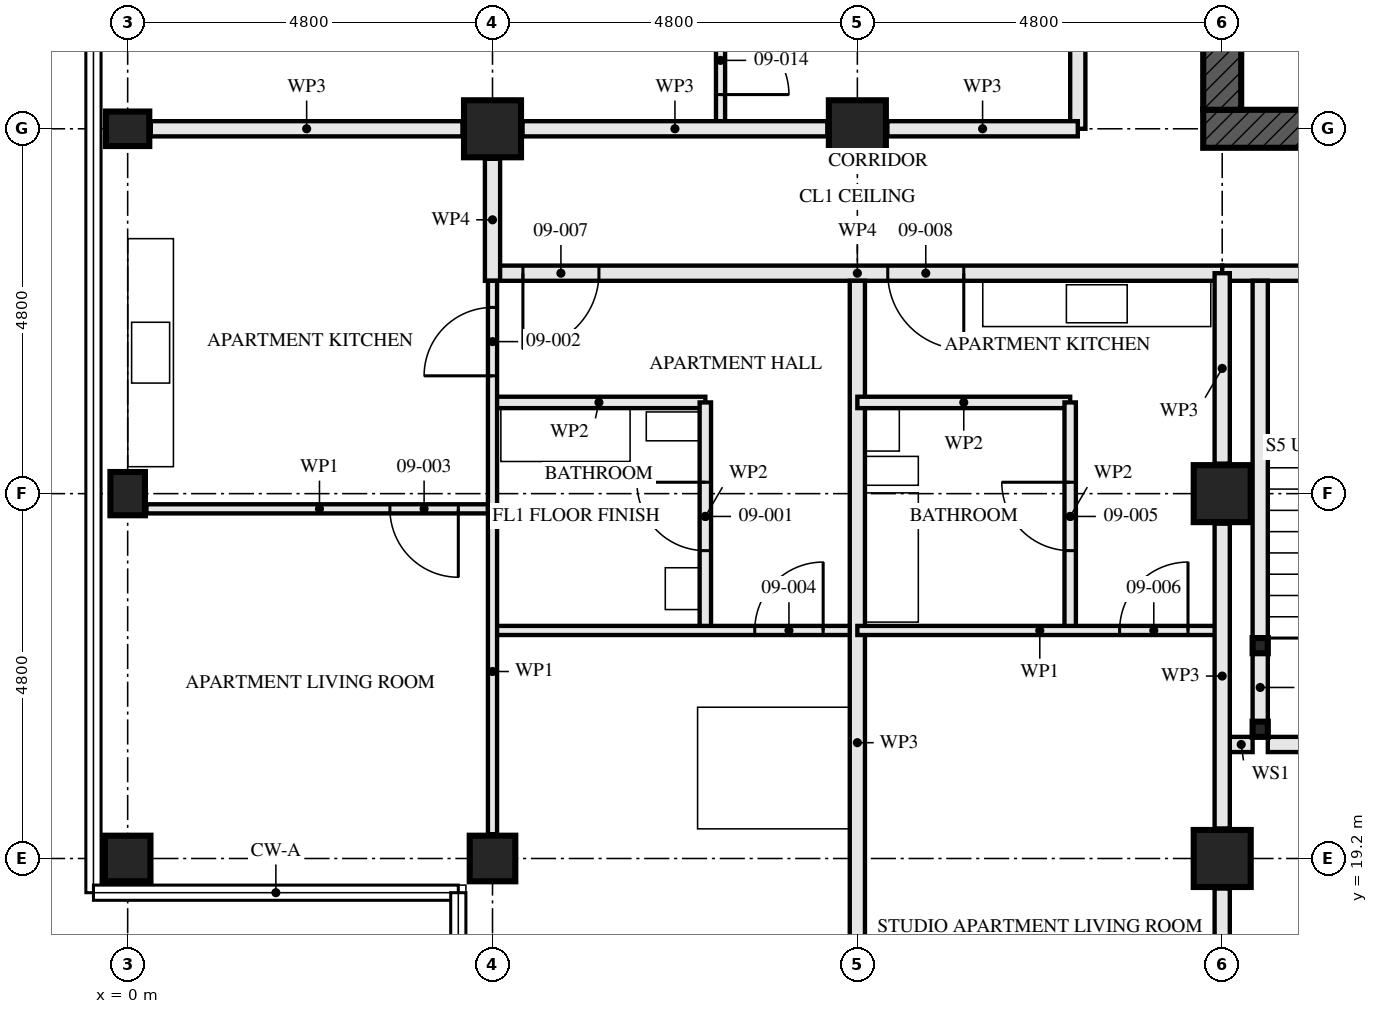
"""IFC4 building model, lengths in metres.
Left out: names, types, materials, properties, quantities, classifications, styles, units other than length and angle.
Written with IfcOpenShell. Run it as: python <this file> out.ifc"""

import sys

from ifc_helpers import new_model, si_unit, direction, frame, frame_2d, origin, origin_2d, place, context, subcontext, project, spatial, rectangle, hollow_rectangle, i_section, extrude, element, fill, save


model = new_model("IFC4")
c1 = context("Model", 3, precision=1e-05, world=origin(), true_north=direction((0.0, 1.0)))
c2 = subcontext(c1, "Body", "Model", "MODEL_VIEW")
j1 = project(units=[si_unit("LENGTHUNIT", "METRE"), si_unit("PLANEANGLEUNIT", "RADIAN")], contexts=[c1])
p1 = place(None, origin())
s1 = spatial("IfcSite", under=j1, at=p1, CompositionType="ELEMENT")
p2 = place(p1, origin())
s2 = spatial("IfcBuilding", under=s1, at=p2, CompositionType="ELEMENT")
p3 = place(p2, frame((0.0, 0.0, 37.5)))
s3 = spatial("IfcBuildingStorey", under=s2, at=p3, CompositionType="ELEMENT", Elevation=37.5)
p4 = place(p3, frame((0.0, 19.2, 0.0), z_axis=(0.0, 0.0, 1.0), x_axis=(0.0, 1.0, 0.0)))
e1 = element("IfcColumn", 1, at=p4, inside=s3, PredefinedType="COLUMN", context=c2, shape_type="SweptSolid", body=[
    extrude(hollow_rectangle(XDim=0.6, YDim=0.6, WallThickness=0.05, at=origin_2d()), origin(), (0.0, 0.0, 1.0), 3.5),
])
for number, where, z_axis, x_axis in (
    (2, (0.0, 24.0, 0.0), (0.0, 0.0, 1.0), (1.0, 0.0, 0.0)),
    (3, (0.0, 28.8, 0.0), (0.0, 0.0, 1.0), (0.0, 1.0, 0.0)),
):
    element("IfcColumn", number, at=place(p3, frame(where, z_axis=z_axis, x_axis=x_axis)), inside=s3, PredefinedType="COLUMN", context=c2, shape_type="SweptSolid", body=[
        extrude(i_section(OverallWidth=0.454, OverallDepth=0.569, WebThickness=0.078, FlangeThickness=0.125, FilletRadius=0.015, at=origin_2d()), origin(), (0.0, 0.0, 1.0), 3.5),
    ])
p5 = place(p3, frame((4.8, 19.2, 0.0), z_axis=(0.0, 0.0, 1.0), x_axis=(0.0, 1.0, 0.0)))
e4 = element("IfcColumn", 4, at=p5, inside=s3, PredefinedType="COLUMN", context=c2, shape_type="SweptSolid", body=[
    extrude(hollow_rectangle(XDim=0.6, YDim=0.6, WallThickness=0.05, at=origin_2d()), origin(), (0.0, 0.0, 1.0), 3.5),
])
for number, where, z_axis, x_axis in (
    (5, (4.8, 28.8, 0.0), (0.0, 0.0, 1.0), (0.0, 1.0, 0.0)),
    (6, (9.6, 28.8, 0.0), (0.0, 0.0, 1.0), (0.0, 1.0, 0.0)),
    (7, (14.4, 19.2, 0.0), (0.0, 0.0, 1.0), (1.0, 0.0, 0.0)),
    (8, (14.4, 24.0, 0.0), (0.0, 0.0, 1.0), (1.0, 0.0, 0.0)),
):
    element("IfcColumn", number, at=place(p3, frame(where, z_axis=z_axis, x_axis=x_axis)), inside=s3, PredefinedType="COLUMN", context=c2, shape_type="SweptSolid", body=[
        extrude(hollow_rectangle(XDim=0.75, YDim=0.75, WallThickness=0.08, at=origin_2d()), origin(), (0.0, 0.0, 1.0), 3.5),
    ])
p6 = place(p3, frame((14.15, 28.8, -0.17), z_axis=(0.0, 0.0, 1.0), x_axis=(1.0, 0.0, 0.0)))
e9 = element("IfcWall", 9, at=p6, inside=s3, PredefinedType="SHEAR", context=c2, shape_type="SweptSolid", body=[
    extrude(rectangle(XDim=14.9, YDim=0.5, at=frame_2d((7.45, 0.0))), origin(), (0.0, 0.0, 1.0), 3.5),
])
p7 = place(p6, frame((6.85, 0.0, 0.17)))
e10 = element("IfcOpeningElement", 10, at=p7, cuts=e9, PredefinedType="OPENING", context=c2, shape_type="SweptSolid", body=[
    extrude(rectangle(XDim=1.2, YDim=2.1, at=frame_2d((0.6, 1.05))), frame((0.0, 0.26, 0.0), z_axis=(0.0, -1.0, 0.0), x_axis=(1.0, 0.0, 0.0)), (0.0, 0.0, 1.0), 0.521),
])
p8 = place(p3, frame((14.4, 42.95, -0.17), z_axis=(0.0, 0.0, 1.0), x_axis=(0.0, -1.0, 0.0)))
e11 = element("IfcWall", 11, at=p8, inside=s3, PredefinedType="SHEAR", context=c2, shape_type="SweptSolid", body=[
    extrude(rectangle(XDim=13.9, YDim=0.5, at=frame_2d((6.95, 0.0))), origin(), (0.0, 0.0, 1.0), 3.5),
])
p9 = place(p8, frame((6.35, 0.0, 0.17)))
e12 = element("IfcOpeningElement", 12, at=p9, cuts=e11, PredefinedType="OPENING", context=c2, shape_type="SweptSolid", body=[
    extrude(rectangle(XDim=1.2, YDim=2.1, at=frame_2d((0.6, 1.05))), frame((0.0, 0.26, 0.0), z_axis=(0.0, -1.0, 0.0), x_axis=(1.0, 0.0, 0.0)), (0.0, 0.0, 1.0), 0.521),
])
for number, where, z_axis, x_axis in (
    (13, (14.9, 20.9, 0.0), (0.0, 0.0, 1.0), (1.0, 0.0, 0.0)),
    (14, (14.9, 22.0, 0.0), (0.0, 0.0, 1.0), (1.0, 0.0, 0.0)),
):
    element("IfcColumn", number, at=place(p3, frame(where, z_axis=z_axis, x_axis=x_axis)), inside=s3, PredefinedType="COLUMN", context=c2, shape_type="SweptSolid", body=[
        extrude(hollow_rectangle(XDim=0.2, YDim=0.2, WallThickness=0.008, at=origin_2d()), origin(), (0.0, 0.0, 1.0), 3.33),
    ])
p10 = place(p3, frame((7.6, 22.2, 0.0), z_axis=(0.0, 0.0, 1.0), x_axis=(0.0, 1.0, 0.0)))
e15 = element("IfcWall", 15, at=p10, inside=s3, PredefinedType="PARTITIONING", context=c2, shape_type="SweptSolid", body=[
    extrude(rectangle(XDim=3.0, YDim=0.15, at=frame_2d((1.5, 0.0))), origin(), (0.0, 0.0, 1.0), 2.55),
])
p11 = place(p10, frame((1.05, 0.0, 0.0)))
e16 = element("IfcOpeningElement", 16, at=p11, cuts=e15, PredefinedType="OPENING", context=c2, shape_type="SweptSolid", body=[
    extrude(rectangle(XDim=0.9, YDim=2.1, at=frame_2d((0.45, 1.05))), frame((0.0, 0.085, 0.0), z_axis=(0.0, -1.0, 0.0), x_axis=(1.0, 0.0, 0.0)), (0.0, 0.0, 1.0), 0.171),
])
p12 = place(p3, frame((4.8, 25.2, 0.0), z_axis=(0.0, 0.0, 1.0), x_axis=(1.0, 0.0, 0.0)))
e17 = element("IfcWall", 17, at=p12, inside=s3, PredefinedType="PARTITIONING", context=c2, shape_type="SweptSolid", body=[
    extrude(rectangle(XDim=2.8, YDim=0.15, at=frame_2d((1.4, 0.0))), origin(), (0.0, 0.0, 1.0), 3.33),
])
p13 = place(p3, frame((4.8, 23.8, 0.0), z_axis=(0.0, 0.0, 1.0), x_axis=(0.0, 1.0, 0.0)))
e18 = element("IfcWall", 18, at=p13, inside=s3, PredefinedType="PARTITIONING", context=c2, shape_type="SweptSolid", body=[
    extrude(rectangle(XDim=3.0, YDim=0.12, at=frame_2d((1.5, 0.0))), origin(), (0.0, 0.0, 1.0), 2.55),
])
p14 = place(p13, frame((1.75, 0.0, 0.0)))
e19 = element("IfcOpeningElement", 19, at=p14, cuts=e18, PredefinedType="OPENING", context=c2, shape_type="SweptSolid", body=[
    extrude(rectangle(XDim=0.9, YDim=2.1, at=frame_2d((0.45, 1.05))), frame((0.0, 0.071, 0.0), z_axis=(0.0, -1.0, 0.0), x_axis=(1.0, 0.0, 0.0)), (0.0, 0.0, 1.0), 0.141),
])
p15 = place(p3, frame((0.247, 23.8, 0.0), z_axis=(0.0, 0.0, 1.0), x_axis=(1.0, 0.0, 0.0)))
e20 = element("IfcWall", 20, at=p15, inside=s3, PredefinedType="PARTITIONING", context=c2, shape_type="SweptSolid", body=[
    extrude(rectangle(XDim=4.553, YDim=0.12, at=frame_2d((2.276, 0.0))), origin(), (0.0, 0.0, 1.0), 3.33),
])
p16 = place(p15, frame((3.203, 0.0, 0.0)))
e21 = element("IfcOpeningElement", 21, at=p16, cuts=e20, PredefinedType="OPENING", context=c2, shape_type="SweptSolid", body=[
    extrude(rectangle(XDim=0.9, YDim=2.1, at=frame_2d((0.45, 1.05))), frame((0.0, 0.071, 0.0), z_axis=(0.0, -1.0, 0.0), x_axis=(1.0, 0.0, 0.0)), (0.0, 0.0, 1.0), 0.141),
])
p17 = place(p3, frame((4.8, 22.2, 0.0), z_axis=(0.0, 0.0, 1.0), x_axis=(1.0, 0.0, 0.0)))
e22 = element("IfcWall", 22, at=p17, inside=s3, PredefinedType="PARTITIONING", context=c2, shape_type="SweptSolid", body=[
    extrude(rectangle(XDim=4.8, YDim=0.12, at=frame_2d((2.4, 0.0))), origin(), (0.0, 0.0, 1.0), 3.33),
])
p18 = place(p17, frame((3.45, 0.0, 0.0)))
e23 = element("IfcOpeningElement", 23, at=p18, cuts=e22, PredefinedType="OPENING", context=c2, shape_type="SweptSolid", body=[
    extrude(rectangle(XDim=0.9, YDim=2.1, at=frame_2d((0.45, 1.05))), frame((0.0, 0.071, 0.0), z_axis=(0.0, -1.0, 0.0), x_axis=(1.0, 0.0, 0.0)), (0.0, 0.0, 1.0), 0.141),
])
p19 = place(p3, frame((4.8, 19.52, 0.0), z_axis=(0.0, 0.0, 1.0), x_axis=(0.0, 1.0, 0.0)))
e24 = element("IfcWall", 24, at=p19, inside=s3, PredefinedType="PARTITIONING", context=c2, shape_type="SweptSolid", body=[
    extrude(rectangle(XDim=4.28, YDim=0.12, at=frame_2d((2.14, 0.0))), origin(), (0.0, 0.0, 1.0), 3.33),
])
p20 = place(p3, frame((9.6, 14.647, 0.0), z_axis=(0.0, 0.0, 1.0), x_axis=(0.0, 1.0, 0.0)))
e25 = element("IfcWall", 25, at=p20, inside=s3, PredefinedType="PARTITIONING", context=c2, shape_type="SweptSolid", body=[
    extrude(rectangle(XDim=12.153, YDim=0.2, at=frame_2d((6.077, 0.0))), origin(), (0.0, 0.0, 1.0), 2.55),
])
p21 = place(p3, frame((12.4, 22.2, 0.0), z_axis=(0.0, 0.0, 1.0), x_axis=(0.0, 1.0, 0.0)))
e26 = element("IfcWall", 26, at=p21, inside=s3, PredefinedType="PARTITIONING", context=c2, shape_type="SweptSolid", body=[
    extrude(rectangle(XDim=3.0, YDim=0.15, at=frame_2d((1.5, 0.0))), origin(), (0.0, 0.0, 1.0), 2.55),
])
p22 = place(p21, frame((1.05, 0.0, 0.0)))
e27 = element("IfcOpeningElement", 27, at=p22, cuts=e26, PredefinedType="OPENING", context=c2, shape_type="SweptSolid", body=[
    extrude(rectangle(XDim=0.9, YDim=2.1, at=frame_2d((0.45, 1.05))), frame((0.0, 0.085, 0.0), z_axis=(0.0, -1.0, 0.0), x_axis=(1.0, 0.0, 0.0)), (0.0, 0.0, 1.0), 0.171),
])
p23 = place(p3, frame((9.6, 25.2, 0.0), z_axis=(0.0, 0.0, 1.0), x_axis=(1.0, 0.0, 0.0)))
e28 = element("IfcWall", 28, at=p23, inside=s3, PredefinedType="PARTITIONING", context=c2, shape_type="SweptSolid", body=[
    extrude(rectangle(XDim=2.8, YDim=0.15, at=frame_2d((1.4, 0.0))), origin(), (0.0, 0.0, 1.0), 3.33),
])
p24 = place(p3, frame((9.6, 22.2, 0.0), z_axis=(0.0, 0.0, 1.0), x_axis=(1.0, 0.0, 0.0)))
e29 = element("IfcWall", 29, at=p24, inside=s3, PredefinedType="PARTITIONING", context=c2, shape_type="SweptSolid", body=[
    extrude(rectangle(XDim=4.8, YDim=0.12, at=frame_2d((2.4, 0.0))), origin(), (0.0, 0.0, 1.0), 3.33),
])
p25 = place(p24, frame((3.45, 0.0, 0.0)))
e30 = element("IfcOpeningElement", 30, at=p25, cuts=e29, PredefinedType="OPENING", context=c2, shape_type="SweptSolid", body=[
    extrude(rectangle(XDim=0.9, YDim=2.1, at=frame_2d((0.45, 1.05))), frame((0.0, 0.071, 0.0), z_axis=(0.0, -1.0, 0.0), x_axis=(1.0, 0.0, 0.0)), (0.0, 0.0, 1.0), 0.141),
])
p26 = place(p3, frame((4.8, 26.9, 0.0), z_axis=(0.0, 0.0, 1.0), x_axis=(1.0, 0.0, 0.0)))
e31 = element("IfcWall", 31, at=p26, inside=s3, PredefinedType="PARTITIONING", context=c2, shape_type="SweptSolid", body=[
    extrude(rectangle(XDim=9.6, YDim=0.2, at=frame_2d((4.8, 0.0))), origin(), (0.0, 0.0, 1.0), 3.33),
])
p27 = place(p26, frame((0.4, 0.0, 0.0)))
e32 = element("IfcOpeningElement", 32, at=p27, cuts=e31, PredefinedType="OPENING", context=c2, shape_type="SweptSolid", body=[
    extrude(rectangle(XDim=1.0, YDim=2.1, at=frame_2d((0.5, 1.05))), frame((0.0, 0.111, 0.0), z_axis=(0.0, -1.0, 0.0), x_axis=(1.0, 0.0, 0.0)), (0.0, 0.0, 1.0), 0.221),
])
p28 = place(p26, frame((5.2, 0.0, 0.0)))
e33 = element("IfcOpeningElement", 33, at=p28, cuts=e31, PredefinedType="OPENING", context=c2, shape_type="SweptSolid", body=[
    extrude(rectangle(XDim=1.0, YDim=2.1, at=frame_2d((0.5, 1.05))), frame((0.0, 0.111, 0.0), z_axis=(0.0, -1.0, 0.0), x_axis=(1.0, 0.0, 0.0)), (0.0, 0.0, 1.0), 0.221),
])
p29 = place(p3, frame((4.8, 26.8, 0.0), z_axis=(0.0, 0.0, 1.0), x_axis=(0.0, 1.0, 0.0)))
e34 = element("IfcWall", 34, at=p29, inside=s3, PredefinedType="PARTITIONING", context=c2, shape_type="SweptSolid", body=[
    extrude(rectangle(XDim=1.605, YDim=0.2, at=frame_2d((0.802, 0.0))), origin(), (0.0, 0.0, 1.0), 3.33),
])
p30 = place(p3, frame((7.8, 33.6, 0.0), z_axis=(0.0, 0.0, 1.0), x_axis=(0.0, -1.0, 0.0)))
e35 = element("IfcWall", 35, at=p30, inside=s3, PredefinedType="PARTITIONING", context=c2, shape_type="SweptSolid", body=[
    extrude(rectangle(XDim=4.8, YDim=0.12, at=frame_2d((2.4, 0.0))), origin(), (0.0, 0.0, 1.0), 3.33),
])
p31 = place(p30, frame((3.45, 0.0, 0.0)))
e36 = element("IfcOpeningElement", 36, at=p31, cuts=e35, PredefinedType="OPENING", context=c2, shape_type="SweptSolid", body=[
    extrude(rectangle(XDim=0.9, YDim=2.1, at=frame_2d((0.45, 1.05))), frame((0.0, 0.071, 0.0), z_axis=(0.0, -1.0, 0.0), x_axis=(1.0, 0.0, 0.0)), (0.0, 0.0, 1.0), 0.141),
])
p32 = place(p3, frame((12.5, 43.2, 0.0), z_axis=(0.0, 0.0, 1.0), x_axis=(0.0, -1.0, 0.0)))
e37 = element("IfcWall", 37, at=p32, inside=s3, PredefinedType="PARTITIONING", context=c2, shape_type="SweptSolid", body=[
    extrude(rectangle(XDim=14.4, YDim=0.2, at=frame_2d((7.2, 0.0))), origin(), (0.0, 0.0, 1.0), 2.55),
])
p33 = place(p32, frame((1.4, 0.0, 0.0)))
e38 = element("IfcOpeningElement", 38, at=p33, cuts=e37, PredefinedType="OPENING", context=c2, shape_type="SweptSolid", body=[
    extrude(rectangle(XDim=1.0, YDim=2.1, at=frame_2d((0.5, 1.05))), frame((0.0, 0.111, 0.0), z_axis=(0.0, -1.0, 0.0), x_axis=(1.0, 0.0, 0.0)), (0.0, 0.0, 1.0), 0.221),
])
p34 = place(p32, frame((10.0, 0.0, 0.0)))
e39 = element("IfcOpeningElement", 39, at=p34, cuts=e37, PredefinedType="OPENING", context=c2, shape_type="SweptSolid", body=[
    extrude(rectangle(XDim=1.0, YDim=2.1, at=frame_2d((0.5, 1.05))), frame((0.0, 0.111, 0.0), z_axis=(0.0, -1.0, 0.0), x_axis=(1.0, 0.0, 0.0)), (0.0, 0.0, 1.0), 0.221),
])
p35 = place(p3, frame((14.9, 21.0, 0.0), z_axis=(0.0, 0.0, 1.0), x_axis=(0.0, 1.0, 0.0)))
e40 = element("IfcWall", 40, at=p35, inside=s3, PredefinedType="SOLIDWALL", context=c2, shape_type="SweptSolid", body=[
    extrude(rectangle(XDim=0.9, YDim=0.2, at=frame_2d((0.45, 0.0))), origin(), (0.0, 0.0, 1.0), 2.99),
])
p36 = place(p3, frame((14.9, 22.1, 0.0), z_axis=(0.0, 0.0, 1.0), x_axis=(0.0, 1.0, 0.0)))
e41 = element("IfcWall", 41, at=p36, inside=s3, PredefinedType="SOLIDWALL", context=c2, shape_type="SweptSolid", body=[
    extrude(rectangle(XDim=4.7, YDim=0.2, at=frame_2d((2.35, 0.0))), origin(), (0.0, 0.0, 1.0), 2.99),
])
p37 = place(p3, frame((14.5, 20.7, 0.0), z_axis=(0.0, 0.0, 1.0), x_axis=(1.0, 0.0, 0.0)))
e42 = element("IfcWall", 42, at=p37, inside=s3, PredefinedType="SOLIDWALL", context=c2, shape_type="SweptSolid", body=[
    extrude(rectangle(XDim=0.3, YDim=0.2, at=frame_2d((0.15, 0.0))), origin(), (0.0, 0.0, 1.0), 3.33),
])
p38 = place(p3, frame((15.0, 20.7, 0.0), z_axis=(0.0, 0.0, 1.0), x_axis=(1.0, 0.0, 0.0)))
e43 = element("IfcWall", 43, at=p38, inside=s3, PredefinedType="SOLIDWALL", context=c2, shape_type="SweptSolid", body=[
    extrude(rectangle(XDim=2.6, YDim=0.2, at=frame_2d((1.3, 0.0))), origin(), (0.0, 0.0, 1.0), 3.33),
])
p39 = place(p3, frame((14.4, 26.9, 0.0), z_axis=(0.0, 0.0, 1.0), x_axis=(1.0, 0.0, 0.0)))
e44 = element("IfcWall", 44, at=p39, inside=s3, PredefinedType="SOLIDWALL", context=c2, shape_type="SweptSolid", body=[
    extrude(rectangle(XDim=3.4, YDim=0.2, at=frame_2d((1.7, 0.0))), origin(), (0.0, 0.0, 1.0), 3.33),
])
p40 = place(p39, frame((1.4, 0.0, 0.0)))
e45 = element("IfcOpeningElement", 45, at=p40, cuts=e44, PredefinedType="OPENING", context=c2, shape_type="SweptSolid", body=[
    extrude(rectangle(XDim=1.0, YDim=2.1, at=frame_2d((0.5, 1.05))), frame((0.0, 0.111, 0.0), z_axis=(0.0, -1.0, 0.0), x_axis=(1.0, 0.0, 0.0)), (0.0, 0.0, 1.0), 0.221),
])
p41 = place(p3, frame((12.5, 28.8, 0.0), z_axis=(0.0, 0.0, 1.0), x_axis=(-1.0, 0.0, 0.0)))
e46 = element("IfcWall", 46, at=p41, inside=s3, PredefinedType="PARTITIONING", context=c2, shape_type="SweptSolid", body=[
    extrude(rectangle(XDim=2.505, YDim=0.2, at=frame_2d((1.252, 0.0))), origin(), (0.0, 0.0, 1.0), 2.32),
])
p42 = place(p3, frame((9.205, 28.8, 0.0), z_axis=(0.0, 0.0, 1.0), x_axis=(-1.0, 0.0, 0.0)))
e47 = element("IfcWall", 47, at=p42, inside=s3, PredefinedType="PARTITIONING", context=c2, shape_type="SweptSolid", body=[
    extrude(rectangle(XDim=4.01, YDim=0.2, at=frame_2d((2.005, 0.0))), origin(), (0.0, 0.0, 1.0), 2.32),
])
p43 = place(p3, frame((4.405, 28.8, 0.0), z_axis=(0.0, 0.0, 1.0), x_axis=(-1.0, 0.0, 0.0)))
e48 = element("IfcWall", 48, at=p43, inside=s3, PredefinedType="PARTITIONING", context=c2, shape_type="SweptSolid", body=[
    extrude(rectangle(XDim=4.101, YDim=0.2, at=frame_2d((2.05, 0.0))), origin(), (0.0, 0.0, 1.0), 2.32),
])
p44 = place(p3, frame((14.4, 14.647, 0.0), z_axis=(0.0, 0.0, 1.0), x_axis=(0.0, 1.0, 0.0)))
e49 = element("IfcWall", 49, at=p44, inside=s3, PredefinedType="PARTITIONING", context=c2, shape_type="SweptSolid", body=[
    extrude(rectangle(XDim=4.158, YDim=0.2, at=frame_2d((2.079, 0.0))), origin(), (0.0, 0.0, 1.0), 2.32),
])
p45 = place(p3, frame((14.4, 19.595, 0.0), z_axis=(0.0, 0.0, 1.0), x_axis=(0.0, 1.0, 0.0)))
e50 = element("IfcWall", 50, at=p45, inside=s3, PredefinedType="PARTITIONING", context=c2, shape_type="SweptSolid", body=[
    extrude(rectangle(XDim=4.01, YDim=0.2, at=frame_2d((2.005, 0.0))), origin(), (0.0, 0.0, 1.0), 2.32),
])
p46 = place(p3, frame((14.4, 24.395, 0.0), z_axis=(0.0, 0.0, 1.0), x_axis=(0.0, 1.0, 0.0)))
e51 = element("IfcWall", 51, at=p46, inside=s3, PredefinedType="PARTITIONING", context=c2, shape_type="SweptSolid", body=[
    extrude(rectangle(XDim=2.505, YDim=0.2, at=frame_2d((1.252, 0.0))), origin(), (0.0, 0.0, 1.0), 2.32),
])
p47 = place(p11, origin())
e52 = element("IfcDoor", 52, at=p47, inside=s3, OperationType="SINGLE_SWING_LEFT", PredefinedType="DOOR", context=c2, shape_type="SweptSolid", body=[
    extrude(rectangle(XDim=0.9, YDim=2.1, at=frame_2d((0.45, 1.05))), frame((0.0, 0.022, 0.0), z_axis=(0.0, -1.0, 0.0), x_axis=(1.0, 0.0, 0.0)), (0.0, 0.0, 1.0), 0.044),
])
fill(e16, e52)
p48 = place(p14, origin())
e53 = element("IfcDoor", 53, at=p48, inside=s3, OperationType="SINGLE_SWING_RIGHT", PredefinedType="DOOR", context=c2, shape_type="SweptSolid", body=[
    extrude(rectangle(XDim=0.9, YDim=2.1, at=frame_2d((0.45, 1.05))), frame((0.0, 0.022, 0.0), z_axis=(0.0, -1.0, 0.0), x_axis=(1.0, 0.0, 0.0)), (0.0, 0.0, 1.0), 0.044),
])
fill(e19, e53)
p49 = place(p16, frame((0.9, 0.0, 0.0), z_axis=(0.0, 0.0, 1.0), x_axis=(-1.0, 0.0, 0.0)))
e54 = element("IfcDoor", 54, at=p49, inside=s3, OperationType="SINGLE_SWING_RIGHT", PredefinedType="DOOR", context=c2, shape_type="SweptSolid", body=[
    extrude(rectangle(XDim=0.9, YDim=2.1, at=frame_2d((0.45, 1.05))), frame((0.0, 0.022, 0.0), z_axis=(0.0, -1.0, 0.0), x_axis=(1.0, 0.0, 0.0)), (0.0, 0.0, 1.0), 0.044),
])
fill(e21, e54)
p50 = place(p18, origin())
e55 = element("IfcDoor", 55, at=p50, inside=s3, OperationType="SINGLE_SWING_LEFT", PredefinedType="DOOR", context=c2, shape_type="SweptSolid", body=[
    extrude(rectangle(XDim=0.9, YDim=2.1, at=frame_2d((0.45, 1.05))), frame((0.0, 0.022, 0.0), z_axis=(0.0, -1.0, 0.0), x_axis=(1.0, 0.0, 0.0)), (0.0, 0.0, 1.0), 0.044),
])
fill(e23, e55)
p51 = place(p22, origin())
e56 = element("IfcDoor", 56, at=p51, inside=s3, OperationType="SINGLE_SWING_LEFT", PredefinedType="DOOR", context=c2, shape_type="SweptSolid", body=[
    extrude(rectangle(XDim=0.9, YDim=2.1, at=frame_2d((0.45, 1.05))), frame((0.0, 0.022, 0.0), z_axis=(0.0, -1.0, 0.0), x_axis=(1.0, 0.0, 0.0)), (0.0, 0.0, 1.0), 0.044),
])
fill(e27, e56)
p52 = place(p25, origin())
e57 = element("IfcDoor", 57, at=p52, inside=s3, OperationType="SINGLE_SWING_LEFT", PredefinedType="DOOR", context=c2, shape_type="SweptSolid", body=[
    extrude(rectangle(XDim=0.9, YDim=2.1, at=frame_2d((0.45, 1.05))), frame((0.0, 0.022, 0.0), z_axis=(0.0, -1.0, 0.0), x_axis=(1.0, 0.0, 0.0)), (0.0, 0.0, 1.0), 0.044),
])
fill(e30, e57)
p53 = place(p27, frame((1.0, 0.0, 0.0), z_axis=(0.0, 0.0, 1.0), x_axis=(-1.0, 0.0, 0.0)))
e58 = element("IfcDoor", 58, at=p53, inside=s3, OperationType="SINGLE_SWING_LEFT", PredefinedType="DOOR", context=c2, shape_type="SweptSolid", body=[
    extrude(rectangle(XDim=1.0, YDim=2.1, at=frame_2d((0.5, 1.05))), frame((0.0, 0.027, 0.0), z_axis=(0.0, -1.0, 0.0), x_axis=(1.0, 0.0, 0.0)), (0.0, 0.0, 1.0), 0.054),
])
fill(e32, e58)
p54 = place(p28, frame((1.0, 0.0, 0.0), z_axis=(0.0, 0.0, 1.0), x_axis=(-1.0, 0.0, 0.0)))
e59 = element("IfcDoor", 59, at=p54, inside=s3, OperationType="SINGLE_SWING_RIGHT", PredefinedType="DOOR", context=c2, shape_type="SweptSolid", body=[
    extrude(rectangle(XDim=1.0, YDim=2.1, at=frame_2d((0.5, 1.05))), frame((0.0, 0.027, 0.0), z_axis=(0.0, -1.0, 0.0), x_axis=(1.0, 0.0, 0.0)), (0.0, 0.0, 1.0), 0.054),
])
fill(e33, e59)
p55 = place(p31, origin())
e60 = element("IfcDoor", 60, at=p55, inside=s3, OperationType="SINGLE_SWING_LEFT", PredefinedType="DOOR", context=c2, shape_type="SweptSolid", body=[
    extrude(rectangle(XDim=0.9, YDim=2.1, at=frame_2d((0.45, 1.05))), frame((0.0, 0.022, 0.0), z_axis=(0.0, -1.0, 0.0), x_axis=(1.0, 0.0, 0.0)), (0.0, 0.0, 1.0), 0.044),
])
fill(e36, e60)
save(model, sys.argv[1])
